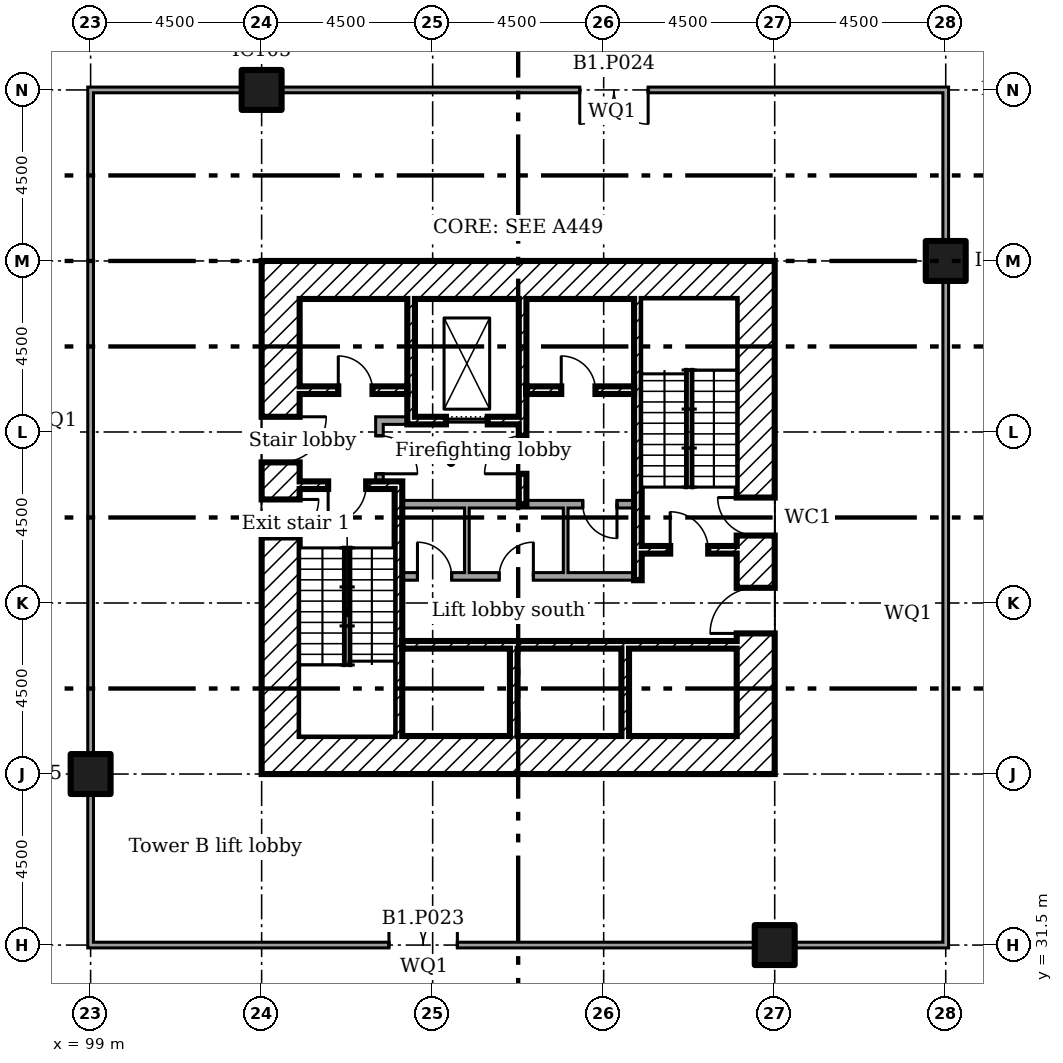
"""IFC4 building model, lengths in metres.
Left out: names, types, materials, properties, quantities, classifications, styles, units other than length and angle.
Written with IfcOpenShell. Run it as: python <this file> out.ifc"""

import sys

from ifc_helpers import new_model, si_unit, direction, frame, frame_2d, origin, origin_2d, place, context, subcontext, project, spatial, rectangle, extrude, element, fill, save


model = new_model("IFC4")
c1 = context("Model", 3, precision=1e-05, world=origin(), true_north=direction((0.0, 1.0)))
c2 = subcontext(c1, "Body", "Model", "MODEL_VIEW")
j1 = project(units=[si_unit("LENGTHUNIT", "METRE"), si_unit("PLANEANGLEUNIT", "RADIAN")], contexts=[c1])
p1 = place(None, origin())
s1 = spatial("IfcSite", under=j1, at=p1, CompositionType="ELEMENT")
p2 = place(p1, origin())
s2 = spatial("IfcBuilding", under=s1, at=p2, CompositionType="ELEMENT")
p3 = place(p2, frame((0.0, 0.0, -4.0)))
s3 = spatial("IfcBuildingStorey", under=s2, at=p3, CompositionType="ELEMENT", Elevation=-4.0)
for number, where in (
    (1, (99.0, 36.0, 0.0)),
    (2, (103.5, 54.0, 0.0)),
    (3, (117.0, 31.5, 0.0)),
    (4, (121.5, 49.5, 0.0)),
):
    element("IfcColumn", number, at=place(p3, frame(where)), inside=s3, PredefinedType="COLUMN", context=c2, shape_type="SweptSolid", body=[
        extrude(rectangle(XDim=1.05, YDim=1.05, at=origin_2d()), origin(), (0.0, 0.0, 1.0), 4.0),
    ])
p4 = place(p3, frame((116.5, 36.0, 0.0), z_axis=(0.0, 0.0, 1.0), x_axis=(0.0, 1.0, 0.0)))
e5 = element("IfcWall", 5, at=p4, inside=s3, PredefinedType="SHEAR", context=c2, shape_type="SweptSolid", body=[
    extrude(rectangle(XDim=13.5, YDim=1.0, at=frame_2d((6.75, 0.0))), origin(), (0.0, 0.0, 1.0), 3.5),
])
p5 = place(p4, frame((3.7, 0.0, 0.0)))
e6 = element("IfcOpeningElement", 6, at=p5, cuts=e5, PredefinedType="OPENING", context=c2, shape_type="SweptSolid", body=[
    extrude(rectangle(XDim=1.2, YDim=2.1, at=frame_2d((0.6, 1.05))), frame((0.0, 0.51, 0.0), z_axis=(0.0, -1.0, 0.0), x_axis=(1.0, 0.0, 0.0)), (0.0, 0.0, 1.0), 1.02),
])
p6 = place(p4, frame((6.275, 0.0, 0.0)))
e7 = element("IfcOpeningElement", 7, at=p6, cuts=e5, PredefinedType="OPENING", context=c2, shape_type="SweptSolid", body=[
    extrude(rectangle(XDim=1.0, YDim=2.1, at=frame_2d((0.5, 1.05))), frame((0.0, 0.51, 0.0), z_axis=(0.0, -1.0, 0.0), x_axis=(1.0, 0.0, 0.0)), (0.0, 0.0, 1.0), 1.02),
])
for number, where in (
    (8, (104.5, 49.0, 0.0)),
    (9, (104.5, 36.5, 0.0)),
):
    element("IfcWall", number, at=place(p3, frame(where)), inside=s3, PredefinedType="SHEAR", context=c2, shape_type="SweptSolid", body=[
        extrude(rectangle(XDim=11.5, YDim=1.0, at=frame_2d((5.75, 0.0))), origin(), (0.0, 0.0, 1.0), 3.5),
    ])
p7 = place(p3, frame((104.0, 36.0, 0.0), z_axis=(0.0, 0.0, 1.0), x_axis=(0.0, 1.0, 0.0)))
e10 = element("IfcWall", 10, at=p7, inside=s3, PredefinedType="SHEAR", context=c2, shape_type="SweptSolid", body=[
    extrude(rectangle(XDim=13.5, YDim=1.0, at=frame_2d((6.75, 0.0))), origin(), (0.0, 0.0, 1.0), 3.5),
])
p8 = place(p7, frame((8.2, 0.0, 0.0)))
e11 = element("IfcOpeningElement", 11, at=p8, cuts=e10, PredefinedType="OPENING", context=c2, shape_type="SweptSolid", body=[
    extrude(rectangle(XDim=1.2, YDim=2.1, at=frame_2d((0.6, 1.05))), frame((0.0, 0.51, 0.0), z_axis=(0.0, -1.0, 0.0), x_axis=(1.0, 0.0, 0.0)), (0.0, 0.0, 1.0), 1.02),
])
p9 = place(p7, frame((6.225, 0.0, 0.0)))
e12 = element("IfcOpeningElement", 12, at=p9, cuts=e10, PredefinedType="OPENING", context=c2, shape_type="SweptSolid", body=[
    extrude(rectangle(XDim=1.0, YDim=2.1, at=frame_2d((0.5, 1.05))), frame((0.0, 0.51, 0.0), z_axis=(0.0, -1.0, 0.0), x_axis=(1.0, 0.0, 0.0)), (0.0, 0.0, 1.0), 1.02),
])
p10 = place(p3, frame((107.433, 48.5, 0.0), z_axis=(0.0, 0.0, 1.0), x_axis=(0.0, -1.0, 0.0)))
e13 = element("IfcWall", 13, at=p10, inside=s3, PredefinedType="SHEAR", context=c2, shape_type="SweptSolid", body=[
    extrude(rectangle(XDim=3.3, YDim=0.2, at=frame_2d((1.65, 0.0))), origin(), (0.0, 0.0, 1.0), 3.5),
])
p11 = place(p3, frame((110.367, 48.5, 0.0), z_axis=(0.0, 0.0, 1.0), x_axis=(0.0, -1.0, 0.0)))
e14 = element("IfcWall", 14, at=p11, inside=s3, PredefinedType="SHEAR", context=c2, shape_type="SweptSolid", body=[
    extrude(rectangle(XDim=5.4, YDim=0.2, at=frame_2d((2.7, 0.0))), origin(), (0.0, 0.0, 1.0), 3.5),
])
p12 = place(p11, frame((3.6, 0.0, 0.0)))
e15 = element("IfcOpeningElement", 15, at=p12, cuts=e14, PredefinedType="OPENING", context=c2, shape_type="SweptSolid", body=[
    extrude(rectangle(XDim=1.0, YDim=2.1, at=frame_2d((0.5, 1.05))), frame((0.0, 0.11, 0.0), z_axis=(0.0, -1.0, 0.0), x_axis=(1.0, 0.0, 0.0)), (0.0, 0.0, 1.0), 0.22),
])
for number, where, z_axis, x_axis in (
    (16, (110.133, 37.0, 0.0), (0.0, 0.0, 1.0), (0.0, 1.0, 0.0)),
    (17, (113.067, 37.0, 0.0), (0.0, 0.0, 1.0), (0.0, 1.0, 0.0)),
):
    element("IfcWall", number, at=place(p3, frame(where, z_axis=z_axis, x_axis=x_axis)), inside=s3, PredefinedType="SHEAR", context=c2, shape_type="SweptSolid", body=[
        extrude(rectangle(XDim=2.3, YDim=0.2, at=frame_2d((1.15, 0.0))), origin(), (0.0, 0.0, 1.0), 3.5),
    ])
p13 = place(p3, frame((106.5, 45.3, 0.0)))
e18 = element("IfcWall", 18, at=p13, inside=s3, PredefinedType="PARTITIONING", context=c2, shape_type="SweptSolid", body=[
    extrude(rectangle(XDim=0.833, YDim=0.2, at=frame_2d((0.417, 0.0))), origin(), (0.0, 0.0, 1.0), 3.5),
])
p14 = place(p3, frame((106.6, 43.7, 0.0), z_axis=(0.0, 0.0, 1.0), x_axis=(0.0, 1.0, 0.0)))
e19 = element("IfcWall", 19, at=p14, inside=s3, PredefinedType="PARTITIONING", context=c2, shape_type="SweptSolid", body=[
    extrude(rectangle(XDim=1.5, YDim=0.2, at=frame_2d((0.75, 0.0))), origin(), (0.0, 0.0, 1.0), 3.5),
])
p15 = place(p14, frame((0.2, 0.0, 0.0)))
e20 = element("IfcOpeningElement", 20, at=p15, cuts=e19, PredefinedType="OPENING", context=c2, shape_type="SweptSolid", body=[
    extrude(rectangle(XDim=1.0, YDim=2.1, at=frame_2d((0.5, 1.05))), frame((0.0, 0.11, 0.0), z_axis=(0.0, -1.0, 0.0), x_axis=(1.0, 0.0, 0.0)), (0.0, 0.0, 1.0), 0.22),
])
p16 = place(p3, frame((104.5, 46.1, 0.0)))
e21 = element("IfcWall", 21, at=p16, inside=s3, PredefinedType="SHEAR", context=c2, shape_type="SweptSolid", body=[
    extrude(rectangle(XDim=2.833, YDim=0.2, at=frame_2d((1.417, 0.0))), origin(), (0.0, 0.0, 1.0), 3.5),
])
p17 = place(p16, frame((1.017, 0.0, 0.0)))
e22 = element("IfcOpeningElement", 22, at=p17, cuts=e21, PredefinedType="OPENING", context=c2, shape_type="SweptSolid", body=[
    extrude(rectangle(XDim=0.9, YDim=2.1, at=frame_2d((0.45, 1.05))), frame((0.0, 0.11, 0.0), z_axis=(0.0, -1.0, 0.0), x_axis=(1.0, 0.0, 0.0)), (0.0, 0.0, 1.0), 0.22),
])
p18 = place(p3, frame((110.467, 46.1, 0.0)))
e23 = element("IfcWall", 23, at=p18, inside=s3, PredefinedType="SHEAR", context=c2, shape_type="SweptSolid", body=[
    extrude(rectangle(XDim=2.833, YDim=0.2, at=frame_2d((1.417, 0.0))), origin(), (0.0, 0.0, 1.0), 3.5),
])
p19 = place(p18, frame((0.917, 0.0, 0.0)))
e24 = element("IfcOpeningElement", 24, at=p19, cuts=e23, PredefinedType="OPENING", context=c2, shape_type="SweptSolid", body=[
    extrude(rectangle(XDim=0.9, YDim=2.1, at=frame_2d((0.45, 1.05))), frame((0.0, 0.11, 0.0), z_axis=(0.0, -1.0, 0.0), x_axis=(1.0, 0.0, 0.0)), (0.0, 0.0, 1.0), 0.22),
])
p20 = place(p3, frame((107.533, 45.3, 0.0)))
e25 = element("IfcWall", 25, at=p20, inside=s3, PredefinedType="SHEAR", context=c2, shape_type="SweptSolid", body=[
    extrude(rectangle(XDim=2.733, YDim=0.2, at=frame_2d((1.367, 0.0))), origin(), (0.0, 0.0, 1.0), 3.5),
])
p21 = place(p20, frame((0.817, 0.0, 0.0)))
e26 = element("IfcOpeningElement", 26, at=p21, cuts=e25, PredefinedType="OPENING", context=c2, shape_type="SweptSolid", body=[
    extrude(rectangle(XDim=1.1, YDim=2.1, at=frame_2d((0.55, 1.05))), frame((0.0, 0.11, 0.0), z_axis=(0.0, -1.0, 0.0), x_axis=(1.0, 0.0, 0.0)), (0.0, 0.0, 1.0), 0.22),
])
p22 = place(p3, frame((107.2, 39.4, 0.0)))
e27 = element("IfcWall", 27, at=p22, inside=s3, PredefinedType="SHEAR", context=c2, shape_type="SweptSolid", body=[
    extrude(rectangle(XDim=8.8, YDim=0.2, at=frame_2d((4.4, 0.0))), origin(), (0.0, 0.0, 1.0), 3.5),
])
p23 = place(p3, frame((107.1, 37.0, 0.0), z_axis=(0.0, 0.0, 1.0), x_axis=(0.0, 1.0, 0.0)))
e28 = element("IfcWall", 28, at=p23, inside=s3, PredefinedType="SHEAR", context=c2, shape_type="SweptSolid", body=[
    extrude(rectangle(XDim=6.7, YDim=0.2, at=frame_2d((3.35, 0.0))), origin(), (0.0, 0.0, 1.0), 3.5),
])
p24 = place(p3, frame((104.5, 43.6, 0.0)))
e29 = element("IfcWall", 29, at=p24, inside=s3, PredefinedType="SHEAR", context=c2, shape_type="SweptSolid", body=[
    extrude(rectangle(XDim=2.5, YDim=0.2, at=frame_2d((1.25, 0.0))), origin(), (0.0, 0.0, 1.0), 3.5),
])
p25 = place(p24, frame((0.75, 0.0, 0.0)))
e30 = element("IfcOpeningElement", 30, at=p25, cuts=e29, PredefinedType="OPENING", context=c2, shape_type="SweptSolid", body=[
    extrude(rectangle(XDim=1.0, YDim=2.1, at=frame_2d((0.5, 1.05))), frame((0.0, 0.11, 0.0), z_axis=(0.0, -1.0, 0.0), x_axis=(1.0, 0.0, 0.0)), (0.0, 0.0, 1.0), 0.22),
])
p26 = place(p3, frame((113.5, 41.9, 0.0)))
e31 = element("IfcWall", 31, at=p26, inside=s3, PredefinedType="SHEAR", context=c2, shape_type="SweptSolid", body=[
    extrude(rectangle(XDim=2.5, YDim=0.2, at=frame_2d((1.25, 0.0))), origin(), (0.0, 0.0, 1.0), 3.5),
])
p27 = place(p26, frame((0.75, 0.0, 0.0)))
e32 = element("IfcOpeningElement", 32, at=p27, cuts=e31, PredefinedType="OPENING", context=c2, shape_type="SweptSolid", body=[
    extrude(rectangle(XDim=1.0, YDim=2.1, at=frame_2d((0.5, 1.05))), frame((0.0, 0.11, 0.0), z_axis=(0.0, -1.0, 0.0), x_axis=(1.0, 0.0, 0.0)), (0.0, 0.0, 1.0), 0.22),
])
p28 = place(p3, frame((113.4, 41.1, 0.0), z_axis=(0.0, 0.0, 1.0), x_axis=(0.0, 1.0, 0.0)))
e33 = element("IfcWall", 33, at=p28, inside=s3, PredefinedType="SHEAR", context=c2, shape_type="SweptSolid", body=[
    extrude(rectangle(XDim=7.4, YDim=0.2, at=frame_2d((3.7, 0.0))), origin(), (0.0, 0.0, 1.0), 3.5),
])
p29 = place(p3, frame((107.2, 43.1, 0.0)))
e34 = element("IfcWall", 34, at=p29, inside=s3, PredefinedType="PARTITIONING", context=c2, shape_type="SweptSolid", body=[
    extrude(rectangle(XDim=6.1, YDim=0.2, at=frame_2d((3.05, 0.0))), origin(), (0.0, 0.0, 1.0), 3.5),
])
p30 = place(p29, frame((4.75, 0.0, 0.0)))
e35 = element("IfcOpeningElement", 35, at=p30, cuts=e34, PredefinedType="OPENING", context=c2, shape_type="SweptSolid", body=[
    extrude(rectangle(XDim=0.9, YDim=2.1, at=frame_2d((0.45, 1.05))), frame((0.0, 0.11, 0.0), z_axis=(0.0, -1.0, 0.0), x_axis=(1.0, 0.0, 0.0)), (0.0, 0.0, 1.0), 0.22),
])
p31 = place(p3, frame((107.2, 41.2, 0.0)))
e36 = element("IfcWall", 36, at=p31, inside=s3, PredefinedType="PARTITIONING", context=c2, shape_type="SweptSolid", body=[
    extrude(rectangle(XDim=6.1, YDim=0.2, at=frame_2d((3.05, 0.0))), origin(), (0.0, 0.0, 1.0), 3.5),
])
p32 = place(p31, frame((0.4, 0.0, 0.0)))
e37 = element("IfcOpeningElement", 37, at=p32, cuts=e36, PredefinedType="OPENING", context=c2, shape_type="SweptSolid", body=[
    extrude(rectangle(XDim=0.9, YDim=2.1, at=frame_2d((0.45, 1.05))), frame((0.0, 0.11, 0.0), z_axis=(0.0, -1.0, 0.0), x_axis=(1.0, 0.0, 0.0)), (0.0, 0.0, 1.0), 0.22),
])
p33 = place(p31, frame((2.55, 0.0, 0.0)))
e38 = element("IfcOpeningElement", 38, at=p33, cuts=e36, PredefinedType="OPENING", context=c2, shape_type="SweptSolid", body=[
    extrude(rectangle(XDim=0.9, YDim=2.1, at=frame_2d((0.45, 1.05))), frame((0.0, 0.11, 0.0), z_axis=(0.0, -1.0, 0.0), x_axis=(1.0, 0.0, 0.0)), (0.0, 0.0, 1.0), 0.22),
])
for number, where, z_axis, x_axis in (
    (39, (108.9, 41.3, 0.0), (0.0, 0.0, 1.0), (0.0, 1.0, 0.0)),
    (40, (111.5, 41.3, 0.0), (0.0, 0.0, 1.0), (0.0, 1.0, 0.0)),
):
    element("IfcWall", number, at=place(p3, frame(where, z_axis=z_axis, x_axis=x_axis)), inside=s3, PredefinedType="PARTITIONING", context=c2, shape_type="SweptSolid", body=[
        extrude(rectangle(XDim=1.7, YDim=0.125, at=frame_2d((0.85, 0.0))), origin(), (0.0, 0.0, 1.0), 3.5),
    ])
p34 = place(p3, frame((99.0, 31.425, 0.0), z_axis=(0.0, 0.0, 1.0), x_axis=(0.0, 1.0, 0.0)))
e41 = element("IfcWall", 41, at=p34, inside=s3, PredefinedType="PARTITIONING", context=c2, shape_type="SweptSolid", body=[
    extrude(rectangle(XDim=4.055, YDim=0.15, at=frame_2d((2.027, 0.0))), origin(), (0.0, 0.0, 1.0), 3.55),
])
for number, where, z_axis, x_axis in (
    (42, (99.0, 36.52, 0.0), (0.0, 0.0, 1.0), (0.0, 1.0, 0.0)),
    (43, (121.5, 31.425, 0.0), (0.0, 0.0, 1.0), (0.0, 1.0, 0.0)),
):
    element("IfcWall", number, at=place(p3, frame(where, z_axis=z_axis, x_axis=x_axis)), inside=s3, PredefinedType="PARTITIONING", context=c2, shape_type="SweptSolid", body=[
        extrude(rectangle(XDim=17.555, YDim=0.15, at=frame_2d((8.777, 0.0))), origin(), (0.0, 0.0, 1.0), 3.55),
    ])
p35 = place(p3, frame((121.5, 50.02, 0.0), z_axis=(0.0, 0.0, 1.0), x_axis=(0.0, 1.0, 0.0)))
e44 = element("IfcWall", 44, at=p35, inside=s3, PredefinedType="PARTITIONING", context=c2, shape_type="SweptSolid", body=[
    extrude(rectangle(XDim=4.055, YDim=0.15, at=frame_2d((2.027, 0.0))), origin(), (0.0, 0.0, 1.0), 3.55),
])
p36 = place(p3, frame((99.075, 31.5, 0.0)))
e45 = element("IfcWall", 45, at=p36, inside=s3, PredefinedType="PARTITIONING", context=c2, shape_type="SweptSolid", body=[
    extrude(rectangle(XDim=17.405, YDim=0.15, at=frame_2d((8.703, 0.0))), origin(), (0.0, 0.0, 1.0), 3.55),
])
p37 = place(p36, frame((7.775, 0.0, 0.0)))
e46 = element("IfcOpeningElement", 46, at=p37, cuts=e45, PredefinedType="OPENING", context=c2, shape_type="SweptSolid", body=[
    extrude(rectangle(XDim=1.8, YDim=2.1, at=frame_2d((0.9, 1.05))), frame((0.0, 0.085, 0.0), z_axis=(0.0, -1.0, 0.0), x_axis=(1.0, 0.0, 0.0)), (0.0, 0.0, 1.0), 0.17),
])
for number, where in (
    (47, (117.52, 31.5, 0.0)),
    (48, (99.075, 54.0, 0.0)),
):
    element("IfcWall", number, at=place(p3, frame(where)), inside=s3, PredefinedType="PARTITIONING", context=c2, shape_type="SweptSolid", body=[
        extrude(rectangle(XDim=3.905, YDim=0.15, at=frame_2d((1.953, 0.0))), origin(), (0.0, 0.0, 1.0), 3.55),
    ])
p38 = place(p3, frame((104.02, 54.0, 0.0)))
e49 = element("IfcWall", 49, at=p38, inside=s3, PredefinedType="PARTITIONING", context=c2, shape_type="SweptSolid", body=[
    extrude(rectangle(XDim=17.405, YDim=0.15, at=frame_2d((8.703, 0.0))), origin(), (0.0, 0.0, 1.0), 3.55),
])
p39 = place(p38, frame((7.85, 0.0, 0.0)))
e50 = element("IfcOpeningElement", 50, at=p39, cuts=e49, PredefinedType="OPENING", context=c2, shape_type="SweptSolid", body=[
    extrude(rectangle(XDim=1.8, YDim=2.1, at=frame_2d((0.9, 1.05))), frame((0.0, 0.085, 0.0), z_axis=(0.0, -1.0, 0.0), x_axis=(1.0, 0.0, 0.0)), (0.0, 0.0, 1.0), 0.17),
])
p40 = place(p8, frame((1.2, 0.0, 0.0), x_axis=(-1.0, 0.0, 0.0)))
e51 = element("IfcDoor", 51, at=p40, inside=s3, OperationType="SINGLE_SWING_RIGHT", PredefinedType="DOOR", context=c2, shape_type="SweptSolid", body=[
    extrude(rectangle(XDim=1.2, YDim=2.1, at=frame_2d((0.6, 1.05))), frame((0.0, 0.025, 0.0), z_axis=(0.0, -1.0, 0.0), x_axis=(1.0, 0.0, 0.0)), (0.0, 0.0, 1.0), 0.05),
])
fill(e11, e51)
p41 = place(p5, origin())
e52 = element("IfcDoor", 52, at=p41, inside=s3, OperationType="SINGLE_SWING_RIGHT", PredefinedType="DOOR", context=c2, shape_type="SweptSolid", body=[
    extrude(rectangle(XDim=1.2, YDim=2.1, at=frame_2d((0.6, 1.05))), frame((0.0, 0.025, 0.0), z_axis=(0.0, -1.0, 0.0), x_axis=(1.0, 0.0, 0.0)), (0.0, 0.0, 1.0), 0.05),
])
fill(e6, e52)
p42 = place(p25, frame((1.0, 0.0, 0.0), x_axis=(-1.0, 0.0, 0.0)))
e53 = element("IfcDoor", 53, at=p42, inside=s3, OperationType="SINGLE_SWING_LEFT", PredefinedType="DOOR", context=c2, shape_type="SweptSolid", body=[
    extrude(rectangle(XDim=1.0, YDim=2.1, at=frame_2d((0.5, 1.05))), frame((0.0, 0.025, 0.0), z_axis=(0.0, -1.0, 0.0), x_axis=(1.0, 0.0, 0.0)), (0.0, 0.0, 1.0), 0.05),
])
fill(e30, e53)
p43 = place(p9, frame((1.0, 0.0, 0.0), x_axis=(-1.0, 0.0, 0.0)))
e54 = element("IfcDoor", 54, at=p43, inside=s3, OperationType="SINGLE_SWING_RIGHT", PredefinedType="DOOR", context=c2, shape_type="SweptSolid", body=[
    extrude(rectangle(XDim=1.0, YDim=2.1, at=frame_2d((0.5, 1.05))), frame((0.0, 0.025, 0.0), z_axis=(0.0, -1.0, 0.0), x_axis=(1.0, 0.0, 0.0)), (0.0, 0.0, 1.0), 0.05),
])
fill(e12, e54)
p44 = place(p27, origin())
e55 = element("IfcDoor", 55, at=p44, inside=s3, OperationType="SINGLE_SWING_RIGHT", PredefinedType="DOOR", context=c2, shape_type="SweptSolid", body=[
    extrude(rectangle(XDim=1.0, YDim=2.1, at=frame_2d((0.5, 1.05))), frame((0.0, 0.025, 0.0), z_axis=(0.0, -1.0, 0.0), x_axis=(1.0, 0.0, 0.0)), (0.0, 0.0, 1.0), 0.05),
])
fill(e32, e55)
p45 = place(p6, origin())
e56 = element("IfcDoor", 56, at=p45, inside=s3, OperationType="SINGLE_SWING_LEFT", PredefinedType="DOOR", context=c2, shape_type="SweptSolid", body=[
    extrude(rectangle(XDim=1.0, YDim=2.1, at=frame_2d((0.5, 1.05))), frame((0.0, 0.025, 0.0), z_axis=(0.0, -1.0, 0.0), x_axis=(1.0, 0.0, 0.0)), (0.0, 0.0, 1.0), 0.05),
])
fill(e7, e56)
p46 = place(p12, frame((1.0, 0.0, 0.0), x_axis=(-1.0, 0.0, 0.0)))
e57 = element("IfcDoor", 57, at=p46, inside=s3, OperationType="SINGLE_SWING_RIGHT", PredefinedType="DOOR", context=c2, shape_type="SweptSolid", body=[
    extrude(rectangle(XDim=1.0, YDim=2.1, at=frame_2d((0.5, 1.05))), frame((0.0, 0.025, 0.0), z_axis=(0.0, -1.0, 0.0), x_axis=(1.0, 0.0, 0.0)), (0.0, 0.0, 1.0), 0.05),
])
fill(e15, e57)
p47 = place(p15, frame((1.0, 0.0, 0.0), x_axis=(-1.0, 0.0, 0.0)))
e58 = element("IfcDoor", 58, at=p47, inside=s3, OperationType="SINGLE_SWING_LEFT", PredefinedType="DOOR", context=c2, shape_type="SweptSolid", body=[
    extrude(rectangle(XDim=1.0, YDim=2.1, at=frame_2d((0.5, 1.05))), frame((0.0, 0.025, 0.0), z_axis=(0.0, -1.0, 0.0), x_axis=(1.0, 0.0, 0.0)), (0.0, 0.0, 1.0), 0.05),
])
fill(e20, e58)
p48 = place(p17, origin())
e59 = element("IfcDoor", 59, at=p48, inside=s3, OperationType="SINGLE_SWING_RIGHT", PredefinedType="DOOR", context=c2, shape_type="SweptSolid", body=[
    extrude(rectangle(XDim=0.9, YDim=2.1, at=frame_2d((0.45, 1.05))), frame((0.0, 0.025, 0.0), z_axis=(0.0, -1.0, 0.0), x_axis=(1.0, 0.0, 0.0)), (0.0, 0.0, 1.0), 0.05),
])
fill(e22, e59)
p49 = place(p19, origin())
e60 = element("IfcDoor", 60, at=p49, inside=s3, OperationType="SINGLE_SWING_RIGHT", PredefinedType="DOOR", context=c2, shape_type="SweptSolid", body=[
    extrude(rectangle(XDim=0.9, YDim=2.1, at=frame_2d((0.45, 1.05))), frame((0.0, 0.025, 0.0), z_axis=(0.0, -1.0, 0.0), x_axis=(1.0, 0.0, 0.0)), (0.0, 0.0, 1.0), 0.05),
])
fill(e24, e60)
p50 = place(p32, origin())
e61 = element("IfcDoor", 61, at=p50, inside=s3, OperationType="SINGLE_SWING_RIGHT", PredefinedType="DOOR", context=c2, shape_type="SweptSolid", body=[
    extrude(rectangle(XDim=0.9, YDim=2.1, at=frame_2d((0.45, 1.05))), frame((0.0, 0.025, 0.0), z_axis=(0.0, -1.0, 0.0), x_axis=(1.0, 0.0, 0.0)), (0.0, 0.0, 1.0), 0.05),
])
fill(e37, e61)
p51 = place(p33, origin())
e62 = element("IfcDoor", 62, at=p51, inside=s3, OperationType="SINGLE_SWING_LEFT", PredefinedType="DOOR", context=c2, shape_type="SweptSolid", body=[
    extrude(rectangle(XDim=0.9, YDim=2.1, at=frame_2d((0.45, 1.05))), frame((0.0, 0.025, 0.0), z_axis=(0.0, -1.0, 0.0), x_axis=(1.0, 0.0, 0.0)), (0.0, 0.0, 1.0), 0.05),
])
fill(e38, e62)
p52 = place(p30, frame((0.9, 0.0, 0.0), x_axis=(-1.0, 0.0, 0.0)))
e63 = element("IfcDoor", 63, at=p52, inside=s3, OperationType="SINGLE_SWING_RIGHT", PredefinedType="DOOR", context=c2, shape_type="SweptSolid", body=[
    extrude(rectangle(XDim=0.9, YDim=2.1, at=frame_2d((0.45, 1.05))), frame((0.0, 0.025, 0.0), z_axis=(0.0, -1.0, 0.0), x_axis=(1.0, 0.0, 0.0)), (0.0, 0.0, 1.0), 0.05),
])
fill(e35, e63)
p53 = place(p21, origin())
e64 = element("IfcDoor", 64, at=p53, inside=s3, OperationType="SLIDING_TO_LEFT", PredefinedType="DOOR", context=c2, shape_type="SweptSolid", body=[
    extrude(rectangle(XDim=1.1, YDim=2.1, at=frame_2d((0.55, 1.05))), frame((0.0, 0.025, 0.0), z_axis=(0.0, -1.0, 0.0), x_axis=(1.0, 0.0, 0.0)), (0.0, 0.0, 1.0), 0.05),
])
fill(e26, e64)
p54 = place(p37, origin())
e65 = element("IfcDoor", 65, at=p54, inside=s3, OperationType="DOUBLE_DOOR_SINGLE_SWING", PredefinedType="DOOR", context=c2, shape_type="SweptSolid", body=[
    extrude(rectangle(XDim=1.8, YDim=2.1, at=frame_2d((0.9, 1.05))), frame((0.0, 0.025, 0.0), z_axis=(0.0, -1.0, 0.0), x_axis=(1.0, 0.0, 0.0)), (0.0, 0.0, 1.0), 0.05),
])
fill(e46, e65)
p55 = place(p39, frame((1.8, 0.0, 0.0), x_axis=(-1.0, 0.0, 0.0)))
e66 = element("IfcDoor", 66, at=p55, inside=s3, OperationType="DOUBLE_DOOR_SINGLE_SWING", PredefinedType="DOOR", context=c2, shape_type="SweptSolid", body=[
    extrude(rectangle(XDim=1.8, YDim=2.1, at=frame_2d((0.9, 1.05))), frame((0.0, 0.025, 0.0), z_axis=(0.0, -1.0, 0.0), x_axis=(1.0, 0.0, 0.0)), (0.0, 0.0, 1.0), 0.05),
])
fill(e50, e66)
save(model, sys.argv[1])
